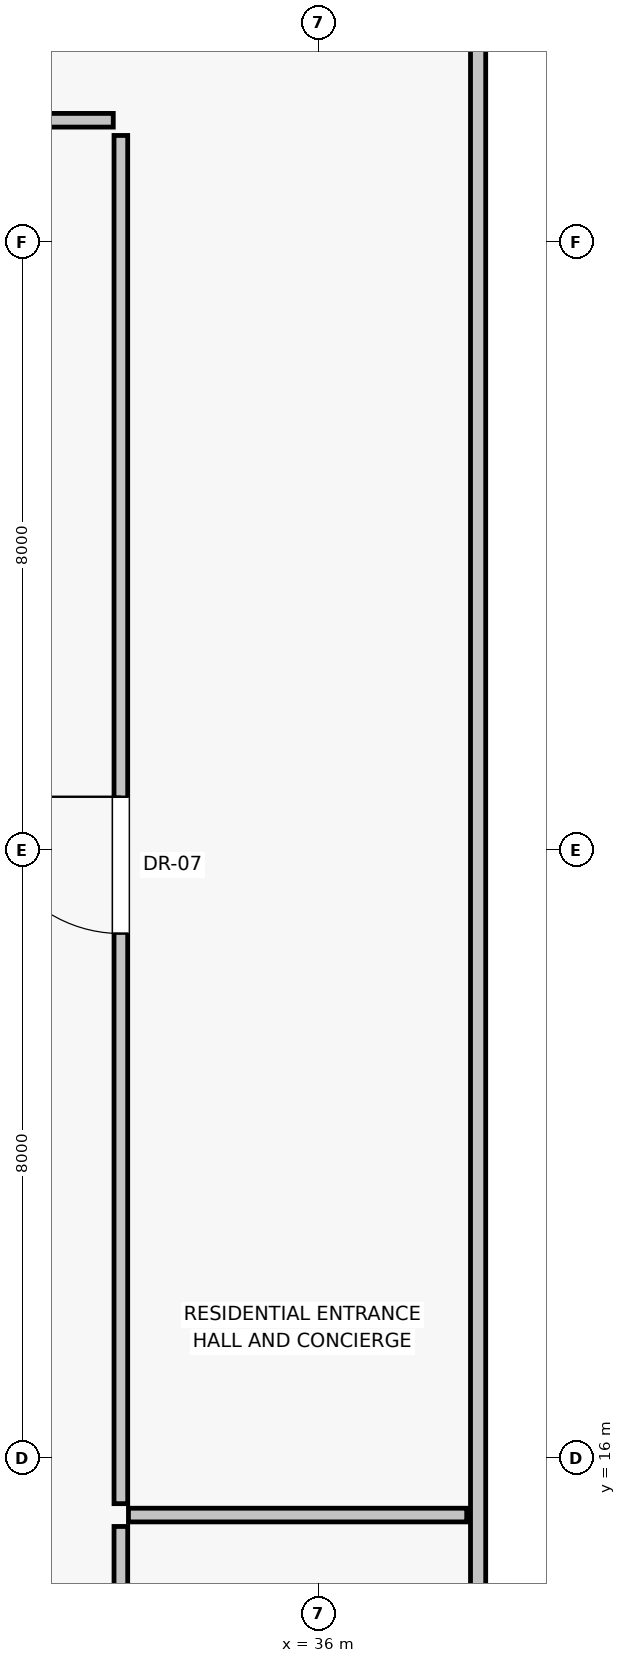
"""IFC4 building model, lengths in metres.
Left out: names, types, materials, properties, quantities, classifications, styles, units other than length and angle.
Written with IfcOpenShell. Run it as: python <this file> out.ifc"""

import sys

from ifc_helpers import new_model, si_unit, direction, frame, frame_2d, origin, place, context, subcontext, project, spatial, rectangle, extrude, source, transform, mapped, element, fill, save


model = new_model("IFC4")
c1 = context("Model", 3, precision=1e-05, world=origin(), true_north=direction((0.0, 1.0)))
c2 = subcontext(c1, "Body", "Model", "MODEL_VIEW")
j1 = project(units=[si_unit("LENGTHUNIT", "METRE"), si_unit("PLANEANGLEUNIT", "RADIAN")], contexts=[c1])
p1 = place(None, origin())
s1 = spatial("IfcSite", under=j1, at=p1, CompositionType="ELEMENT")
p2 = place(p1, origin())
s2 = spatial("IfcBuilding", under=s1, at=p2, CompositionType="ELEMENT")
p3 = place(p2, origin())
s3 = spatial("IfcBuildingStorey", under=s2, at=p3, CompositionType="ELEMENT", Elevation=0.0)
p4 = place(p3, frame((38.1, 6.2, 0.0), z_axis=(0.0, 0.0, 1.0), x_axis=(0.0, 1.0, 0.0)))
e1 = element("IfcWall", 1, at=p4, inside=s3, PredefinedType="SOLIDWALL", context=c2, shape_type="SweptSolid", body=[
    extrude(rectangle(XDim=33.8, YDim=0.2, at=frame_2d((16.9, 0.0))), origin(), (0.0, 0.0, 1.0), 4.9),
])
p5 = place(p3, frame((33.4, 10.0, 0.0), z_axis=(0.0, 0.0, 1.0), x_axis=(0.0, 1.0, 0.0)))
e2 = element("IfcWall", 2, at=p5, inside=s3, PredefinedType="PARTITIONING", context=c2, shape_type="SweptSolid", body=[
    extrude(rectangle(XDim=5.1, YDim=0.18, at=frame_2d((2.55, 0.0))), origin(), (0.0, 0.0, 1.0), 4.9),
])
p6 = place(p5, frame((1.8, 0.0, 0.0)))
e3 = element("IfcOpeningElement", 3, at=p6, cuts=e2, PredefinedType="OPENING", context=c2, shape_type="SweptSolid", body=[
    extrude(rectangle(XDim=1.1, YDim=2.03, at=frame_2d((0.55, 1.015))), frame((0.0, 0.1, 0.0), z_axis=(0.0, -1.0, 0.0), x_axis=(1.0, 0.0, 0.0)), (0.0, 0.0, 1.0), 0.2),
])
p7 = place(p3, frame((33.4, 15.4, 0.0), z_axis=(0.0, 0.0, 1.0), x_axis=(0.0, 1.0, 0.0)))
e4 = element("IfcWall", 4, at=p7, inside=s3, PredefinedType="PARTITIONING", context=c2, shape_type="SweptSolid", body=[
    extrude(rectangle(XDim=18.0, YDim=0.18, at=frame_2d((9.0, 0.0))), origin(), (0.0, 0.0, 1.0), 4.9),
])
p8 = place(p7, frame((7.5, 0.0, 0.0)))
e5 = element("IfcOpeningElement", 5, at=p8, cuts=e4, PredefinedType="OPENING", context=c2, shape_type="SweptSolid", body=[
    extrude(rectangle(XDim=1.8, YDim=2.25, at=frame_2d((0.9, 1.125))), frame((0.0, 0.1, 0.0), z_axis=(0.0, -1.0, 0.0), x_axis=(1.0, 0.0, 0.0)), (0.0, 0.0, 1.0), 0.2),
])
p9 = place(p3, frame((33.5, 15.25, 0.0), z_axis=(0.0, 0.0, 1.0), x_axis=(1.0, 0.0, 0.0)))
e6 = element("IfcWall", 6, at=p9, inside=s3, PredefinedType="PARTITIONING", context=c2, shape_type="SweptSolid", body=[
    extrude(rectangle(XDim=4.45, YDim=0.18, at=frame_2d((2.225, 0.0))), origin(), (0.0, 0.0, 1.0), 4.9),
])
p10 = place(p3, frame((26.35, 33.6, 0.0), z_axis=(0.0, 0.0, 1.0), x_axis=(1.0, 0.0, 0.0)))
e7 = element("IfcWall", 7, at=p10, inside=s3, PredefinedType="PARTITIONING", context=c2, shape_type="SweptSolid", body=[
    extrude(rectangle(XDim=6.95, YDim=0.18, at=frame_2d((3.475, 0.0))), origin(), (0.0, 0.0, 1.0), 4.9),
])
p11 = place(p10, frame((2.8, 0.0, 0.0)))
e8 = element("IfcOpeningElement", 8, at=p11, cuts=e7, PredefinedType="OPENING", context=c2, shape_type="SweptSolid", body=[
    extrude(rectangle(XDim=1.0, YDim=2.01, at=frame_2d((0.5, 1.005))), frame((0.0, 0.1, 0.0), z_axis=(0.0, -1.0, 0.0), x_axis=(1.0, 0.0, 0.0)), (0.0, 0.0, 1.0), 0.2),
])
m1 = source(origin(), c2, "Body", "SweptSolid", [
    extrude(rectangle(XDim=1.8, YDim=2.25, at=frame_2d((0.9, 1.125))), frame((0.0, 0.025, 0.0), z_axis=(0.0, -1.0, 0.0), x_axis=(1.0, 0.0, 0.0)), (0.0, 0.0, 1.0), 0.05),
])
p12 = place(p8, origin())
e9 = element("IfcDoor", 9, at=p12, inside=s3, OperationType="SINGLE_SWING_RIGHT", PredefinedType="DOOR", context=c2, shape_type="MappedRepresentation", body=[
    mapped(m1, transform((0.0, 0.0, 0.0), scale=1.0)),
])
fill(e5, e9)
save(model, sys.argv[1])
